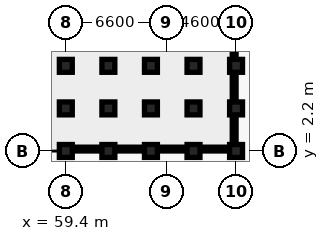
"""IFC4 building model, lengths in metres.
Left out: names, types, materials, properties, quantities, classifications, styles, units other than length and angle.
Written with IfcOpenShell. Run it as: python <this file> out.ifc"""

import sys

from ifc_helpers import new_model, si_unit, direction, frame, frame_2d, origin, origin_2d, place, context, subcontext, project, spatial, rectangle, extrude, element, fill, save


model = new_model("IFC4")
c1 = context("Model", 3, precision=1e-05, world=origin(), true_north=direction((0.0, 1.0)))
c2 = subcontext(c1, "Body", "Model", "MODEL_VIEW")
j1 = project(units=[si_unit("LENGTHUNIT", "METRE"), si_unit("PLANEANGLEUNIT", "RADIAN")], contexts=[c1])
p1 = place(None, origin())
s1 = spatial("IfcSite", under=j1, at=p1, CompositionType="ELEMENT")
p2 = place(p1, origin())
s2 = spatial("IfcBuilding", under=s1, at=p2, CompositionType="ELEMENT")
p3 = place(p2, origin())
s3 = spatial("IfcBuildingStorey", under=s2, at=p3, CompositionType="ELEMENT", Elevation=0.0)
for number, where, z_axis, x_axis in (
    (1, (59.4, 7.8, 0.0), (0.0, 0.0, 1.0), (1.0, 0.0, 0.0)),
    (2, (59.4, 5.0, 0.0), (0.0, 0.0, 1.0), (1.0, 0.0, 0.0)),
    (3, (59.4, 2.2, 0.0), (0.0, 0.0, 1.0), (1.0, 0.0, 0.0)),
    (4, (62.2, 7.8, 0.0), (0.0, 0.0, 1.0), (1.0, 0.0, 0.0)),
    (5, (62.2, 5.0, 0.0), (0.0, 0.0, 1.0), (1.0, 0.0, 0.0)),
    (6, (62.2, 2.2, 0.0), (0.0, 0.0, 1.0), (1.0, 0.0, 0.0)),
    (7, (65.0, 7.8, 0.0), (0.0, 0.0, 1.0), (1.0, 0.0, 0.0)),
    (8, (65.0, 5.0, 0.0), (0.0, 0.0, 1.0), (1.0, 0.0, 0.0)),
    (9, (65.0, 2.2, 0.0), (0.0, 0.0, 1.0), (1.0, 0.0, 0.0)),
    (10, (67.8, 7.8, 0.0), (0.0, 0.0, 1.0), (1.0, 0.0, 0.0)),
    (11, (67.8, 5.0, 0.0), (0.0, 0.0, 1.0), (1.0, 0.0, 0.0)),
    (12, (67.8, 2.2, 0.0), (0.0, 0.0, 1.0), (1.0, 0.0, 0.0)),
    (13, (70.6, 7.8, 0.0), (0.0, 0.0, 1.0), (1.0, 0.0, 0.0)),
    (14, (70.6, 5.0, 0.0), (0.0, 0.0, 1.0), (1.0, 0.0, 0.0)),
    (15, (70.6, 2.2, 0.0), (0.0, 0.0, 1.0), (1.0, 0.0, 0.0)),
):
    element("IfcColumn", number, at=place(p3, frame(where, z_axis=z_axis, x_axis=x_axis)), inside=s3, PredefinedType="COLUMN", context=c2, shape_type="SweptSolid", body=[
        extrude(rectangle(XDim=0.85, YDim=0.85, at=origin_2d()), origin(), (0.0, 0.0, 1.0), 4.15),
    ])
p4 = place(p3, frame((59.48, 7.8, 0.0), z_axis=(0.0, 0.0, 1.0), x_axis=(1.0, 0.0, 0.0)))
e16 = element("IfcWall", 16, at=p4, inside=s3, PredefinedType="PLUMBINGWALL", context=c2, shape_type="SweptSolid", body=[
    extrude(rectangle(XDim=2.64, YDim=0.16, at=frame_2d((1.32, 0.0))), origin(), (0.0, 0.0, 1.0), 3.492),
])
p5 = place(p4, frame((0.87, 0.0, 0.0)))
e17 = element("IfcOpeningElement", 17, at=p5, cuts=e16, PredefinedType="OPENING", context=c2, shape_type="SweptSolid", body=[
    extrude(rectangle(XDim=0.9, YDim=2.1, at=frame_2d((0.45, 1.05))), frame((0.0, 0.09, 0.0), z_axis=(0.0, -1.0, 0.0), x_axis=(1.0, 0.0, 0.0)), (0.0, 0.0, 1.0), 0.18),
])
p6 = place(p3, frame((62.28, 7.8, 0.0), z_axis=(0.0, 0.0, 1.0), x_axis=(1.0, 0.0, 0.0)))
e18 = element("IfcWall", 18, at=p6, inside=s3, PredefinedType="PLUMBINGWALL", context=c2, shape_type="SweptSolid", body=[
    extrude(rectangle(XDim=2.64, YDim=0.16, at=frame_2d((1.32, 0.0))), origin(), (0.0, 0.0, 1.0), 3.492),
])
p7 = place(p6, frame((0.92, 0.0, 0.0)))
e19 = element("IfcOpeningElement", 19, at=p7, cuts=e18, PredefinedType="OPENING", context=c2, shape_type="SweptSolid", body=[
    extrude(rectangle(XDim=0.8, YDim=2.1, at=frame_2d((0.4, 1.05))), frame((0.0, 0.09, 0.0), z_axis=(0.0, -1.0, 0.0), x_axis=(1.0, 0.0, 0.0)), (0.0, 0.0, 1.0), 0.18),
])
p8 = place(p3, frame((65.08, 7.8, 0.0), z_axis=(0.0, 0.0, 1.0), x_axis=(1.0, 0.0, 0.0)))
e20 = element("IfcWall", 20, at=p8, inside=s3, PredefinedType="PLUMBINGWALL", context=c2, shape_type="SweptSolid", body=[
    extrude(rectangle(XDim=2.64, YDim=0.16, at=frame_2d((1.32, 0.0))), origin(), (0.0, 0.0, 1.0), 3.492),
])
p9 = place(p8, frame((0.87, 0.0, 0.0)))
e21 = element("IfcOpeningElement", 21, at=p9, cuts=e20, PredefinedType="OPENING", context=c2, shape_type="SweptSolid", body=[
    extrude(rectangle(XDim=0.9, YDim=2.1, at=frame_2d((0.45, 1.05))), frame((0.0, 0.09, 0.0), z_axis=(0.0, -1.0, 0.0), x_axis=(1.0, 0.0, 0.0)), (0.0, 0.0, 1.0), 0.18),
])
p10 = place(p3, frame((67.88, 7.8, 0.0), z_axis=(0.0, 0.0, 1.0), x_axis=(1.0, 0.0, 0.0)))
e22 = element("IfcWall", 22, at=p10, inside=s3, PredefinedType="PLUMBINGWALL", context=c2, shape_type="SweptSolid", body=[
    extrude(rectangle(XDim=2.64, YDim=0.16, at=frame_2d((1.32, 0.0))), origin(), (0.0, 0.0, 1.0), 3.492),
])
p11 = place(p10, frame((0.92, 0.0, 0.0)))
e23 = element("IfcOpeningElement", 23, at=p11, cuts=e22, PredefinedType="OPENING", context=c2, shape_type="SweptSolid", body=[
    extrude(rectangle(XDim=0.8, YDim=2.1, at=frame_2d((0.4, 1.05))), frame((0.0, 0.09, 0.0), z_axis=(0.0, -1.0, 0.0), x_axis=(1.0, 0.0, 0.0)), (0.0, 0.0, 1.0), 0.18),
])
p12 = place(p3, frame((59.4, 13.3, 0.0), z_axis=(0.0, 0.0, 1.0), x_axis=(0.0, -1.0, 0.0)))
e24 = element("IfcWall", 24, at=p12, inside=s3, PredefinedType="PARTITIONING", context=c2, shape_type="SweptSolid", body=[
    extrude(rectangle(XDim=10.82, YDim=0.15, at=frame_2d((5.41, 0.0))), origin(), (0.0, 0.0, 1.0), 3.492),
])
p13 = place(p12, frame((0.899, 0.0, 0.0)))
e25 = element("IfcOpeningElement", 25, at=p13, cuts=e24, PredefinedType="OPENING", context=c2, shape_type="SweptSolid", body=[
    extrude(rectangle(XDim=0.8, YDim=2.1, at=frame_2d((0.4, 1.05))), frame((0.0, 0.085, 0.0), z_axis=(0.0, -1.0, 0.0), x_axis=(1.0, 0.0, 0.0)), (0.0, 0.0, 1.0), 0.17),
])
p14 = place(p3, frame((62.2, 13.3, 0.0), z_axis=(0.0, 0.0, 1.0), x_axis=(0.0, -1.0, 0.0)))
e26 = element("IfcWall", 26, at=p14, inside=s3, PredefinedType="PARTITIONING", context=c2, shape_type="SweptSolid", body=[
    extrude(rectangle(XDim=10.82, YDim=0.15, at=frame_2d((5.41, 0.0))), origin(), (0.0, 0.0, 1.0), 3.492),
])
p15 = place(p14, frame((0.899, 0.0, 0.0)))
e27 = element("IfcOpeningElement", 27, at=p15, cuts=e26, PredefinedType="OPENING", context=c2, shape_type="SweptSolid", body=[
    extrude(rectangle(XDim=0.8, YDim=2.1, at=frame_2d((0.4, 1.05))), frame((0.0, 0.085, 0.0), z_axis=(0.0, -1.0, 0.0), x_axis=(1.0, 0.0, 0.0)), (0.0, 0.0, 1.0), 0.17),
])
p16 = place(p3, frame((65.0, 13.3, 0.0), z_axis=(0.0, 0.0, 1.0), x_axis=(0.0, -1.0, 0.0)))
e28 = element("IfcWall", 28, at=p16, inside=s3, PredefinedType="STANDARD", context=c2, shape_type="SweptSolid", body=[
    extrude(rectangle(XDim=10.82, YDim=0.22, at=frame_2d((5.41, 0.0))), origin(), (0.0, 0.0, 1.0), 3.492),
])
p17 = place(p3, frame((67.8, 13.3, 0.0), z_axis=(0.0, 0.0, 1.0), x_axis=(0.0, -1.0, 0.0)))
e29 = element("IfcWall", 29, at=p17, inside=s3, PredefinedType="PARTITIONING", context=c2, shape_type="SweptSolid", body=[
    extrude(rectangle(XDim=10.82, YDim=0.15, at=frame_2d((5.41, 0.0))), origin(), (0.0, 0.0, 1.0), 3.492),
])
p18 = place(p17, frame((0.899, 0.0, 0.0)))
e30 = element("IfcOpeningElement", 30, at=p18, cuts=e29, PredefinedType="OPENING", context=c2, shape_type="SweptSolid", body=[
    extrude(rectangle(XDim=0.8, YDim=2.1, at=frame_2d((0.4, 1.05))), frame((0.0, 0.085, 0.0), z_axis=(0.0, -1.0, 0.0), x_axis=(1.0, 0.0, 0.0)), (0.0, 0.0, 1.0), 0.17),
])
p19 = place(p3, frame((59.829, 2.325, 0.0), z_axis=(0.0, 0.0, 1.0), x_axis=(1.0, 0.0, 0.0)))
e31 = element("IfcWall", 31, at=p19, inside=s3, PredefinedType="STANDARD", context=c2, shape_type="SweptSolid", body=[
    extrude(rectangle(XDim=1.943, YDim=0.25, at=frame_2d((0.971, 0.0))), origin(), (0.0, 0.0, 1.0), 3.692),
])
p20 = place(p19, frame((0.497, 0.0, 0.88)))
e32 = element("IfcOpeningElement", 32, at=p20, cuts=e31, PredefinedType="OPENING", context=c2, shape_type="SweptSolid", body=[
    extrude(rectangle(XDim=0.95, YDim=1.35, at=frame_2d((0.475, 0.675))), frame((0.0, 0.135, 0.0), z_axis=(0.0, -1.0, 0.0), x_axis=(1.0, 0.0, 0.0)), (0.0, 0.0, 1.0), 0.27),
])
p21 = place(p3, frame((62.628, 2.325, 0.0), z_axis=(0.0, 0.0, 1.0), x_axis=(1.0, 0.0, 0.0)))
e33 = element("IfcWall", 33, at=p21, inside=s3, PredefinedType="STANDARD", context=c2, shape_type="SweptSolid", body=[
    extrude(rectangle(XDim=1.943, YDim=0.25, at=frame_2d((0.972, 0.0))), origin(), (0.0, 0.0, 1.0), 3.692),
])
p22 = place(p21, frame((0.372, 0.0, 0.88)))
e34 = element("IfcOpeningElement", 34, at=p22, cuts=e33, PredefinedType="OPENING", context=c2, shape_type="SweptSolid", body=[
    extrude(rectangle(XDim=1.2, YDim=1.5, at=frame_2d((0.6, 0.75))), frame((0.0, 0.135, 0.0), z_axis=(0.0, -1.0, 0.0), x_axis=(1.0, 0.0, 0.0)), (0.0, 0.0, 1.0), 0.27),
])
p23 = place(p3, frame((65.428, 2.325, 0.0), z_axis=(0.0, 0.0, 1.0), x_axis=(1.0, 0.0, 0.0)))
e35 = element("IfcWall", 35, at=p23, inside=s3, PredefinedType="STANDARD", context=c2, shape_type="SweptSolid", body=[
    extrude(rectangle(XDim=1.943, YDim=0.25, at=frame_2d((0.972, 0.0))), origin(), (0.0, 0.0, 1.0), 3.692),
])
p24 = place(p23, frame((0.372, 0.0, 0.88)))
e36 = element("IfcOpeningElement", 36, at=p24, cuts=e35, PredefinedType="OPENING", context=c2, shape_type="SweptSolid", body=[
    extrude(rectangle(XDim=1.2, YDim=1.5, at=frame_2d((0.6, 0.75))), frame((0.0, 0.135, 0.0), z_axis=(0.0, -1.0, 0.0), x_axis=(1.0, 0.0, 0.0)), (0.0, 0.0, 1.0), 0.27),
])
p25 = place(p3, frame((68.229, 2.325, 0.0), z_axis=(0.0, 0.0, 1.0), x_axis=(1.0, 0.0, 0.0)))
e37 = element("IfcWall", 37, at=p25, inside=s3, PredefinedType="STANDARD", context=c2, shape_type="SweptSolid", body=[
    extrude(rectangle(XDim=1.943, YDim=0.25, at=frame_2d((0.971, 0.0))), origin(), (0.0, 0.0, 1.0), 3.692),
])
p26 = place(p25, frame((0.421, 0.0, 0.88)))
e38 = element("IfcOpeningElement", 38, at=p26, cuts=e37, PredefinedType="OPENING", context=c2, shape_type="SweptSolid", body=[
    extrude(rectangle(XDim=1.1, YDim=1.45, at=frame_2d((0.55, 0.725))), frame((0.0, 0.135, 0.0), z_axis=(0.0, -1.0, 0.0), x_axis=(1.0, 0.0, 0.0)), (0.0, 0.0, 1.0), 0.27),
])
p27 = place(p3, frame((70.475, 10.18, 0.0), z_axis=(0.0, 0.0, 1.0), x_axis=(0.0, -1.0, 0.0)))
e39 = element("IfcWall", 39, at=p27, inside=s3, PredefinedType="STANDARD", context=c2, shape_type="SweptSolid", body=[
    extrude(rectangle(XDim=1.96, YDim=0.25, at=frame_2d((0.98, 0.0))), origin(), (0.0, 0.0, 1.0), 3.492),
])
p28 = place(p27, frame((0.38, 0.0, 0.88)))
e40 = element("IfcOpeningElement", 40, at=p28, cuts=e39, PredefinedType="OPENING", context=c2, shape_type="SweptSolid", body=[
    extrude(rectangle(XDim=1.2, YDim=1.5, at=frame_2d((0.6, 0.75))), frame((0.0, 0.135, 0.0), z_axis=(0.0, -1.0, 0.0), x_axis=(1.0, 0.0, 0.0)), (0.0, 0.0, 1.0), 0.27),
])
p29 = place(p3, frame((70.475, 7.38, 0.0), z_axis=(0.0, 0.0, 1.0), x_axis=(0.0, -1.0, 0.0)))
e41 = element("IfcWall", 41, at=p29, inside=s3, PredefinedType="STANDARD", context=c2, shape_type="SweptSolid", body=[
    extrude(rectangle(XDim=1.96, YDim=0.25, at=frame_2d((0.98, 0.0))), origin(), (0.0, 0.0, 1.0), 3.492),
])
p30 = place(p29, frame((0.38, 0.0, 0.88)))
e42 = element("IfcOpeningElement", 42, at=p30, cuts=e41, PredefinedType="OPENING", context=c2, shape_type="SweptSolid", body=[
    extrude(rectangle(XDim=1.2, YDim=1.5, at=frame_2d((0.6, 0.75))), frame((0.0, 0.135, 0.0), z_axis=(0.0, -1.0, 0.0), x_axis=(1.0, 0.0, 0.0)), (0.0, 0.0, 1.0), 0.27),
])
p31 = place(p3, frame((70.475, 4.58, 0.0), z_axis=(0.0, 0.0, 1.0), x_axis=(0.0, -1.0, 0.0)))
e43 = element("IfcWall", 43, at=p31, inside=s3, PredefinedType="STANDARD", context=c2, shape_type="SweptSolid", body=[
    extrude(rectangle(XDim=1.96, YDim=0.25, at=frame_2d((0.98, 0.0))), origin(), (0.0, 0.0, 1.0), 3.492),
])
p32 = place(p31, frame((0.38, 0.0, 0.88)))
e44 = element("IfcOpeningElement", 44, at=p32, cuts=e43, PredefinedType="OPENING", context=c2, shape_type="SweptSolid", body=[
    extrude(rectangle(XDim=1.2, YDim=1.5, at=frame_2d((0.6, 0.75))), frame((0.0, 0.135, 0.0), z_axis=(0.0, -1.0, 0.0), x_axis=(1.0, 0.0, 0.0)), (0.0, 0.0, 1.0), 0.27),
])
p33 = place(p20, origin())
e45 = element("IfcWindow", 45, at=p33, inside=s3, PartitioningType="SINGLE_PANEL", PredefinedType="WINDOW", context=c2, shape_type="SweptSolid", body=[
    extrude(rectangle(XDim=0.95, YDim=1.35, at=frame_2d((0.475, 0.675))), frame((0.0, 0.03, 0.0), z_axis=(0.0, -1.0, 0.0), x_axis=(1.0, 0.0, 0.0)), (0.0, 0.0, 1.0), 0.06),
])
fill(e32, e45)
p34 = place(p22, origin())
e46 = element("IfcWindow", 46, at=p34, inside=s3, PartitioningType="SINGLE_PANEL", PredefinedType="WINDOW", context=c2, shape_type="SweptSolid", body=[
    extrude(rectangle(XDim=1.2, YDim=1.5, at=frame_2d((0.6, 0.75))), frame((0.0, 0.03, 0.0), z_axis=(0.0, -1.0, 0.0), x_axis=(1.0, 0.0, 0.0)), (0.0, 0.0, 1.0), 0.06),
])
fill(e34, e46)
p35 = place(p24, origin())
e47 = element("IfcWindow", 47, at=p35, inside=s3, PartitioningType="SINGLE_PANEL", PredefinedType="WINDOW", context=c2, shape_type="SweptSolid", body=[
    extrude(rectangle(XDim=1.2, YDim=1.5, at=frame_2d((0.6, 0.75))), frame((0.0, 0.03, 0.0), z_axis=(0.0, -1.0, 0.0), x_axis=(1.0, 0.0, 0.0)), (0.0, 0.0, 1.0), 0.06),
])
fill(e36, e47)
p36 = place(p26, origin())
e48 = element("IfcWindow", 48, at=p36, inside=s3, PartitioningType="SINGLE_PANEL", PredefinedType="WINDOW", context=c2, shape_type="SweptSolid", body=[
    extrude(rectangle(XDim=1.1, YDim=1.45, at=frame_2d((0.55, 0.725))), frame((0.0, 0.03, 0.0), z_axis=(0.0, -1.0, 0.0), x_axis=(1.0, 0.0, 0.0)), (0.0, 0.0, 1.0), 0.06),
])
fill(e38, e48)
p37 = place(p28, origin())
e49 = element("IfcWindow", 49, at=p37, inside=s3, PartitioningType="SINGLE_PANEL", PredefinedType="WINDOW", context=c2, shape_type="SweptSolid", body=[
    extrude(rectangle(XDim=1.2, YDim=1.5, at=frame_2d((0.6, 0.75))), frame((0.0, 0.03, 0.0), z_axis=(0.0, -1.0, 0.0), x_axis=(1.0, 0.0, 0.0)), (0.0, 0.0, 1.0), 0.06),
])
fill(e40, e49)
p38 = place(p30, origin())
e50 = element("IfcWindow", 50, at=p38, inside=s3, PartitioningType="SINGLE_PANEL", PredefinedType="WINDOW", context=c2, shape_type="SweptSolid", body=[
    extrude(rectangle(XDim=1.2, YDim=1.5, at=frame_2d((0.6, 0.75))), frame((0.0, 0.03, 0.0), z_axis=(0.0, -1.0, 0.0), x_axis=(1.0, 0.0, 0.0)), (0.0, 0.0, 1.0), 0.06),
])
fill(e42, e50)
p39 = place(p32, origin())
e51 = element("IfcWindow", 51, at=p39, inside=s3, PartitioningType="SINGLE_PANEL", PredefinedType="WINDOW", context=c2, shape_type="SweptSolid", body=[
    extrude(rectangle(XDim=1.2, YDim=1.5, at=frame_2d((0.6, 0.75))), frame((0.0, 0.03, 0.0), z_axis=(0.0, -1.0, 0.0), x_axis=(1.0, 0.0, 0.0)), (0.0, 0.0, 1.0), 0.06),
])
fill(e44, e51)
p40 = place(p5, origin())
e52 = element("IfcDoor", 52, at=p40, inside=s3, OperationType="SINGLE_SWING_LEFT", PredefinedType="DOOR", context=c2, shape_type="SweptSolid", body=[
    extrude(rectangle(XDim=0.9, YDim=2.1, at=frame_2d((0.45, 1.05))), frame((0.0, 0.025, 0.0), z_axis=(0.0, -1.0, 0.0), x_axis=(1.0, 0.0, 0.0)), (0.0, 0.0, 1.0), 0.05),
])
fill(e17, e52)
p41 = place(p7, origin())
e53 = element("IfcDoor", 53, at=p41, inside=s3, OperationType="SINGLE_SWING_LEFT", PredefinedType="DOOR", context=c2, shape_type="SweptSolid", body=[
    extrude(rectangle(XDim=0.8, YDim=2.1, at=frame_2d((0.4, 1.05))), frame((0.0, 0.025, 0.0), z_axis=(0.0, -1.0, 0.0), x_axis=(1.0, 0.0, 0.0)), (0.0, 0.0, 1.0), 0.05),
])
fill(e19, e53)
p42 = place(p9, origin())
e54 = element("IfcDoor", 54, at=p42, inside=s3, OperationType="SINGLE_SWING_LEFT", PredefinedType="DOOR", context=c2, shape_type="SweptSolid", body=[
    extrude(rectangle(XDim=0.9, YDim=2.1, at=frame_2d((0.45, 1.05))), frame((0.0, 0.025, 0.0), z_axis=(0.0, -1.0, 0.0), x_axis=(1.0, 0.0, 0.0)), (0.0, 0.0, 1.0), 0.05),
])
fill(e21, e54)
p43 = place(p11, origin())
e55 = element("IfcDoor", 55, at=p43, inside=s3, OperationType="SINGLE_SWING_LEFT", PredefinedType="DOOR", context=c2, shape_type="SweptSolid", body=[
    extrude(rectangle(XDim=0.8, YDim=2.1, at=frame_2d((0.4, 1.05))), frame((0.0, 0.025, 0.0), z_axis=(0.0, -1.0, 0.0), x_axis=(1.0, 0.0, 0.0)), (0.0, 0.0, 1.0), 0.05),
])
fill(e23, e55)
save(model, sys.argv[1])
